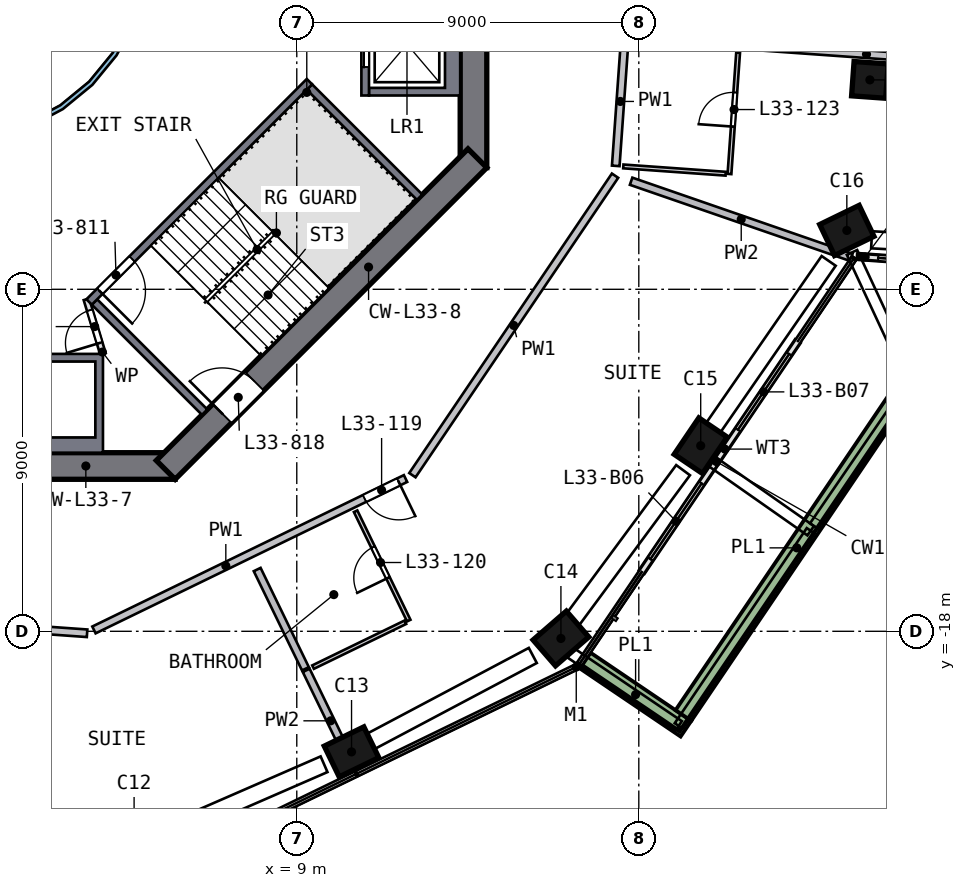
"""IFC4 building model, lengths in metres.
Left out: names, types, materials, properties, quantities, classifications, styles, units other than length and angle.
Written with IfcOpenShell. Run it as: python <this file> out.ifc"""

import sys

from ifc_helpers import new_model, si_unit, direction, frame, frame_2d, origin, origin_2d, place, context, subcontext, project, spatial, polyline, rectangle, outline, extrude, element, fill, save


model = new_model("IFC4")
c1 = context("Model", 3, precision=1e-05, world=origin(), true_north=direction((0.0, 1.0)))
c2 = subcontext(c1, "Body", "Model", "MODEL_VIEW")
j1 = project(units=[si_unit("LENGTHUNIT", "METRE"), si_unit("PLANEANGLEUNIT", "RADIAN")], contexts=[c1])
p1 = place(None, origin())
s1 = spatial("IfcSite", under=j1, at=p1, CompositionType="ELEMENT")
p2 = place(p1, origin())
s2 = spatial("IfcBuilding", under=s1, at=p2, CompositionType="ELEMENT")
p3 = place(p2, frame((0.0, 0.0, 140.0)))
s3 = spatial("IfcBuildingStorey", under=s2, at=p3, CompositionType="ELEMENT", Elevation=140.0)
p4 = place(p3, frame((10.32, -21.233, 0.0), z_axis=(0.100614614, 0.04988903, 0.993673882), x_axis=(0.893958315, 0.433851601, -0.11230013)))
e1 = element("IfcColumn", 1, at=p4, inside=s3, PredefinedType="COLUMN", context=c2, shape_type="SweptSolid", body=[
    extrude(rectangle(XDim=1.15, YDim=0.9, at=origin_2d()), origin(), (0.0, 0.0, 1.0), 3.21),
])
p5 = place(p3, frame((15.846, -18.281, 0.0), z_axis=(0.086290312, 0.076026707, 0.993364949), x_axis=(-0.750890104, -0.650337538, 0.115000597)))
e2 = element("IfcColumn", 2, at=p5, inside=s3, PredefinedType="COLUMN", context=c2, shape_type="SweptSolid", body=[
    extrude(rectangle(XDim=1.15, YDim=0.9, at=origin_2d()), origin(), (0.0, 0.0, 1.0), 3.211),
])
p6 = place(p3, frame((19.554, -13.229, 0.0), z_axis=(0.062208942, 0.093541564, 0.993669977), x_axis=(0.557258378, 0.822705306, -0.112334676)))
e3 = element("IfcColumn", 3, at=p6, inside=s3, PredefinedType="COLUMN", context=c2, shape_type="SweptSolid", body=[
    extrude(rectangle(XDim=1.15, YDim=0.9, at=origin_2d()), origin(), (0.0, 0.0, 1.0), 3.21),
])
p7 = place(p3, frame((23.431, -7.586, 0.0), z_axis=(0.035191514, 0.111731155, 0.993115153), x_axis=(-0.899659746, -0.429169077, 0.080163861)))
e4 = element("IfcColumn", 4, at=p7, inside=s3, PredefinedType="COLUMN", context=c2, shape_type="SweptSolid", body=[
    extrude(rectangle(XDim=1.15, YDim=0.9, at=origin_2d()), origin(), (0.0, 0.0, 1.0), 3.212),
])
p8 = place(p3, frame((24.061, -3.628, 0.0), z_axis=(0.01626837, 0.114562772, 0.993282795), x_axis=(0.997380747, -0.071881336, -0.008044873)))
e5 = element("IfcColumn", 5, at=p8, inside=s3, PredefinedType="COLUMN", context=c2, shape_type="SweptSolid", body=[
    extrude(rectangle(XDim=0.9, YDim=0.9, at=origin_2d()), origin(), (0.0, 0.0, 1.0), 3.211),
])
p9 = place(p3, frame((13.65, -5.799, 0.0), z_axis=(0.0, 0.0, 1.0), x_axis=(0.0, 1.0, 0.0)))
e6 = element("IfcWall", 6, at=p9, inside=s3, PredefinedType="SHEAR", context=c2, shape_type="SweptSolid", body=[
    extrude(rectangle(XDim=11.598, YDim=0.7, at=frame_2d((5.799, 0.0))), origin(), (0.0, 0.0, 1.0), 3.5),
])
p10 = place(p9, frame((4.899, 0.0, 0.0)))
e7 = element("IfcOpeningElement", 7, at=p10, cuts=e6, PredefinedType="OPENING", context=c2, shape_type="SweptSolid", body=[
    extrude(rectangle(XDim=1.8, YDim=2.1, at=frame_2d((0.9, 1.05))), frame((0.0, 0.36, 0.0), z_axis=(0.0, -1.0, 0.0), x_axis=(1.0, 0.0, 0.0)), (0.0, 0.0, 1.0), 0.72),
])
p11 = place(p3, frame((-5.799, -13.65, 0.0), z_axis=(0.0, 0.0, 1.0), x_axis=(1.0, 0.0, 0.0)))
e8 = element("IfcWall", 8, at=p11, inside=s3, PredefinedType="SHEAR", context=c2, shape_type="SweptSolid", body=[
    extrude(rectangle(XDim=11.598, YDim=0.7, at=frame_2d((5.799, 0.0))), origin(), (0.0, 0.0, 1.0), 3.5),
])
p12 = place(p11, frame((4.899, 0.0, 0.0)))
e9 = element("IfcOpeningElement", 9, at=p12, cuts=e8, PredefinedType="OPENING", context=c2, shape_type="SweptSolid", body=[
    extrude(rectangle(XDim=1.8, YDim=2.1, at=frame_2d((0.9, 1.05))), frame((0.0, 0.36, 0.0), z_axis=(0.0, -1.0, 0.0), x_axis=(1.0, 0.0, 0.0)), (0.0, 0.0, 1.0), 0.72),
])
p13 = place(p3, frame((5.552, -13.752, 0.0), z_axis=(0.0, 0.0, 1.0), x_axis=(0.707106781, 0.707106781, 0.0)))
e10 = element("IfcWall", 10, at=p13, inside=s3, PredefinedType="SHEAR", context=c2, shape_type="SweptSolid", body=[
    extrude(rectangle(XDim=11.598, YDim=0.7, at=frame_2d((5.799, 0.0))), origin(), (0.0, 0.0, 1.0), 3.5),
])
p14 = place(p13, frame((2.099, 0.0, 0.0)))
e11 = element("IfcOpeningElement", 11, at=p14, cuts=e10, PredefinedType="OPENING", context=c2, shape_type="SweptSolid", body=[
    extrude(rectangle(XDim=1.2, YDim=2.1, at=frame_2d((0.6, 1.05))), frame((0.0, 0.36, 0.0), z_axis=(0.0, -1.0, 0.0), x_axis=(1.0, 0.0, 0.0)), (0.0, 0.0, 1.0), 0.72),
])
p15 = place(p3, frame((18.083, -16.429, 0.0), z_axis=(0.0, 0.0, 1.0), x_axis=(0.560361819, 0.828247929, 0.0)))
e12 = element("IfcWall", 12, at=p15, inside=s3, PredefinedType="SOLIDWALL", context=c2, shape_type="SweptSolid", body=[
    extrude(rectangle(XDim=3.475, YDim=0.15, at=frame_2d((1.738, 0.0))), origin(), (0.0, 0.0, 1.0), 2.475),
])
p16 = place(p15, frame((0.4, 0.0, 0.0)))
e13 = element("IfcOpeningElement", 13, at=p16, cuts=e12, PredefinedType="OPENING", context=c2, shape_type="SweptSolid", body=[
    extrude(rectangle(XDim=2.4, YDim=2.4, at=frame_2d((1.2, 1.2))), frame((0.0, 0.085, 0.0), z_axis=(0.0, -1.0, 0.0), x_axis=(1.0, 0.0, 0.0)), (0.0, 0.0, 1.0), 0.17),
])
p17 = place(p3, frame((20.03, -13.551, 0.0), z_axis=(0.0, 0.0, 1.0), x_axis=(0.560342762, 0.828260822, 0.0)))
e14 = element("IfcWall", 14, at=p17, inside=s3, PredefinedType="SOLIDWALL", context=c2, shape_type="SweptSolid", body=[
    extrude(rectangle(XDim=3.835, YDim=0.15, at=frame_2d((1.918, 0.0))), origin(), (0.0, 0.0, 1.0), 2.475),
])
p18 = place(p17, frame((1.035, 0.0, 0.0)))
e15 = element("IfcOpeningElement", 15, at=p18, cuts=e14, PredefinedType="OPENING", context=c2, shape_type="SweptSolid", body=[
    extrude(rectangle(XDim=2.4, YDim=2.4, at=frame_2d((1.2, 1.2))), frame((0.0, 0.085, 0.0), z_axis=(0.0, -1.0, 0.0), x_axis=(1.0, 0.0, 0.0)), (0.0, 0.0, 1.0), 0.17),
])
p19 = place(p3, frame((23.81, -8.14, 0.0), z_axis=(0.0, 0.0, 1.0), x_axis=(0.997464717, -0.071162762, 0.0)))
e16 = element("IfcWall", 16, at=p19, inside=s3, PredefinedType="SOLIDWALL", context=c2, shape_type="SweptSolid", body=[
    extrude(rectangle(XDim=3.293, YDim=0.15, at=frame_2d((1.647, 0.0))), origin(), (0.0, 0.0, 1.0), 2.475),
])
p20 = place(p19, frame((0.494, 0.0, 0.0)))
e17 = element("IfcOpeningElement", 17, at=p20, cuts=e16, PredefinedType="OPENING", context=c2, shape_type="SweptSolid", body=[
    extrude(rectangle(XDim=2.4, YDim=2.4, at=frame_2d((1.2, 1.2))), frame((0.0, 0.085, 0.0), z_axis=(0.0, -1.0, 0.0), x_axis=(1.0, 0.0, 0.0)), (0.0, 0.0, 1.0), 0.17),
])
p21 = place(p3, frame((16.591, -18.77, 0.0), z_axis=(0.0, 0.0, 1.0), x_axis=(0.828214652, -0.560411001, 0.0)))
e18 = element("IfcWall", 18, at=p21, inside=s3, PredefinedType="SOLIDWALL", context=c2, shape_type="SweptSolid", body=[
    extrude(rectangle(XDim=3.199, YDim=0.5, at=frame_2d((1.6, 0.0))), origin(), (0.0, 0.0, 1.0), 0.7),
])
p22 = place(p3, frame((19.173, -20.216, 0.0), z_axis=(0.0, 0.0, 1.0), x_axis=(0.560356999, 0.82825119, 0.0)))
e19 = element("IfcWall", 19, at=p22, inside=s3, PredefinedType="SOLIDWALL", context=c2, shape_type="SweptSolid", body=[
    extrude(rectangle(XDim=10.653, YDim=0.5, at=frame_2d((5.326, 0.0))), origin(), (0.0, 0.0, 1.0), 0.7),
])
p23 = place(p3, origin())
e20 = element("IfcWall", 20, at=p23, inside=s3, PredefinedType="SOLIDWALL", context=c2, shape_type="SweptSolid", body=[
    extrude(outline(polyline([(13.3, -3.9), (10.9, -3.9), (10.9, -3.7), (12.9, -3.7), (12.9, -1.4), (10.9, -1.4), (10.9, -1.2), (13.3, -1.2), (13.3, -3.9)])), origin(), (0.0, 0.0, 1.0), 3.19),
])
p24 = place(p3, frame((10.8, -1.2, 0.0), z_axis=(0.0, 0.0, 1.0), x_axis=(0.0, -1.0, 0.0)))
e21 = element("IfcWall", 21, at=p24, inside=s3, PredefinedType="SOLIDWALL", context=c2, shape_type="SweptSolid", body=[
    extrude(rectangle(XDim=2.7, YDim=0.2, at=frame_2d((1.35, 0.0))), origin(), (0.0, 0.0, 1.0), 3.19),
])
p25 = place(p24, frame((0.75, 0.0, 0.0)))
e22 = element("IfcOpeningElement", 22, at=p25, cuts=e21, PredefinedType="OPENING", context=c2, shape_type="SweptSolid", body=[
    extrude(rectangle(XDim=1.2, YDim=2.1, at=frame_2d((0.6, 1.05))), frame((0.0, 0.11, 0.0), z_axis=(0.0, -1.0, 0.0), x_axis=(1.0, 0.0, 0.0)), (0.0, 0.0, 1.0), 0.22),
])
p26 = place(p3, origin())
e23 = element("IfcWall", 23, at=p26, inside=s3, PredefinedType="SOLIDWALL", context=c2, shape_type="SweptSolid", body=[
    extrude(outline(polyline([(3.9, -10.7), (3.9, -13.3), (1.2, -13.3), (1.2, -10.7), (3.9, -10.7)]), holes=[polyline([(1.4, -12.9), (3.7, -12.9), (3.7, -10.9), (1.4, -10.9), (1.4, -12.9)])]), origin(), (0.0, 0.0, 1.0), 3.19),
])
p27 = place(p3, frame((9.334, -3.535, 0.0), z_axis=(0.0, 0.0, 1.0), x_axis=(-0.707106781, -0.707106781, 0.0)))
e24 = element("IfcWall", 24, at=p27, inside=s3, PredefinedType="SOLIDWALL", context=c2, shape_type="SweptSolid", body=[
    extrude(rectangle(XDim=8.2, YDim=0.2, at=frame_2d((4.1, 0.0))), origin(), (0.0, 0.0, 1.0), 3.19),
])
p28 = place(p27, frame((6.6, 0.0, 0.0)))
e25 = element("IfcOpeningElement", 25, at=p28, cuts=e24, PredefinedType="OPENING", context=c2, shape_type="SweptSolid", body=[
    extrude(rectangle(XDim=1.2, YDim=2.1, at=frame_2d((0.6, 1.05))), frame((0.0, 0.11, 0.0), z_axis=(0.0, -1.0, 0.0), x_axis=(1.0, 0.0, 0.0)), (0.0, 0.0, 1.0), 0.22),
])
for number, where, z_axis, x_axis in (
    (26, (3.677, -9.334, 0.0), (0.0, 0.0, 1.0), (0.707, -0.707, 0.0)),
    (27, (9.334, -3.677, 0.0), (0.0, 0.0, 1.0), (0.707, -0.707, 0.0)),
):
    element("IfcWall", number, at=place(p3, frame(where, z_axis=z_axis, x_axis=x_axis)), inside=s3, PredefinedType="SOLIDWALL", context=c2, shape_type="SweptSolid", body=[
        extrude(rectangle(XDim=4.1, YDim=0.2, at=frame_2d((2.05, 0.0))), origin(), (0.0, 0.0, 1.0), 3.19),
    ])
p29 = place(p3, frame((3.9, -10.7, 0.0), z_axis=(0.0, 0.0, 1.0), x_axis=(-0.289808785, 0.957084567, 0.0)))
e28 = element("IfcWall", 28, at=p29, inside=s3, PredefinedType="PARTITIONING", context=c2, shape_type="SweptSolid", body=[
    extrude(rectangle(XDim=1.501, YDim=0.15, at=frame_2d((0.75, 0.0))), origin(), (0.0, 0.0, 1.0), 3.19),
])
p30 = place(p29, frame((0.301, 0.0, 0.0)))
e29 = element("IfcOpeningElement", 29, at=p30, cuts=e28, PredefinedType="OPENING", context=c2, shape_type="SweptSolid", body=[
    extrude(rectangle(XDim=0.9, YDim=2.1, at=frame_2d((0.45, 1.05))), frame((0.0, 0.085, 0.0), z_axis=(0.0, -1.0, 0.0), x_axis=(1.0, 0.0, 0.0)), (0.0, 0.0, 1.0), 0.17),
])
p31 = place(p3, origin())
e30 = element("IfcWall", 30, at=p31, inside=s3, PredefinedType="SOLIDWALL", context=c2, shape_type="SweptSolid", body=[
    extrude(outline(polyline([(5.021, -0.999), (4.73, -1.959), (4.257, -2.844), (3.62, -3.62), (2.844, -4.257), (1.959, -4.73), (0.999, -5.021), (0.0, -5.12), (-0.999, -5.021), (-1.959, -4.73), (-2.844, -4.257), (-3.62, -3.62), (-4.257, -2.844), (-4.73, -1.959), (-5.021, -0.999), (-5.12, 0.0), (-5.021, 0.999), (-4.73, 1.959), (-4.257, 2.844), (-3.62, 3.62), (-2.844, 4.257), (-1.959, 4.73), (-0.999, 5.021), (0.0, 5.12), (0.999, 5.021), (1.959, 4.73), (2.844, 4.257), (3.62, 3.62), (4.257, 2.844), (4.73, 1.959), (5.021, 0.999), (5.12, 0.0), (5.021, -0.999)]), holes=[polyline([(4.904, 0.976), (4.619, 1.913), (4.157, 2.778), (3.535, 3.535), (2.778, 4.157), (1.913, 4.619), (0.976, 4.904), (0.0, 5.0), (-0.976, 4.904), (-1.913, 4.619), (-2.778, 4.157), (-3.535, 3.535), (-4.157, 2.778), (-4.619, 1.913), (-4.904, 0.976), (-5.0, 0.0), (-4.904, -0.976), (-4.619, -1.913), (-4.157, -2.778), (-3.535, -3.535), (-2.778, -4.157), (-1.913, -4.619), (-0.976, -4.904), (0.0, -5.0), (0.976, -4.904), (1.913, -4.619), (2.778, -4.157), (3.535, -3.535), (4.157, -2.778), (4.619, -1.913), (4.904, -0.976), (5.0, 0.0), (4.904, 0.976)])]), origin(), (0.0, 0.0, 1.0), 3.19),
])
p32 = place(p3, frame((3.482, -18.052, 0.0), z_axis=(0.0, 0.0, 1.0), x_axis=(-0.997466118, 0.071143125, 0.0)))
e31 = element("IfcWall", 31, at=p32, inside=s3, PredefinedType="SOLIDWALL", context=c2, shape_type="SweptSolid", body=[
    extrude(rectangle(XDim=9.516, YDim=0.2, at=frame_2d((4.758, 0.0))), origin(), (0.0, 0.0, 1.0), 3.19),
])
p33 = place(p32, frame((5.15, 0.0, 0.0)))
e32 = element("IfcOpeningElement", 32, at=p33, cuts=e31, PredefinedType="OPENING", context=c2, shape_type="SweptSolid", body=[
    extrude(rectangle(XDim=1.0, YDim=2.1, at=frame_2d((0.5, 1.05))), frame((0.0, 0.11, 0.0), z_axis=(0.0, -1.0, 0.0), x_axis=(1.0, 0.0, 0.0)), (0.0, 0.0, 1.0), 0.22),
])
p34 = place(p3, frame((11.862, -13.98, 0.0), z_axis=(0.0, 0.0, 1.0), x_axis=(-0.899416115, -0.437093413, 0.0)))
e33 = element("IfcWall", 33, at=p34, inside=s3, PredefinedType="SOLIDWALL", context=c2, shape_type="SweptSolid", body=[
    extrude(rectangle(XDim=9.116, YDim=0.2, at=frame_2d((4.558, 0.0))), origin(), (0.0, 0.0, 1.0), 3.19),
])
p35 = place(p34, frame((0.2, 0.0, 0.0)))
e34 = element("IfcOpeningElement", 34, at=p35, cuts=e33, PredefinedType="OPENING", context=c2, shape_type="SweptSolid", body=[
    extrude(rectangle(XDim=1.0, YDim=2.1, at=frame_2d((0.5, 1.05))), frame((0.0, 0.11, 0.0), z_axis=(0.0, -1.0, 0.0), x_axis=(1.0, 0.0, 0.0)), (0.0, 0.0, 1.0), 0.22),
])
p36 = place(p3, frame((12.042, -13.892, 0.0), z_axis=(0.0, 0.0, 1.0), x_axis=(0.560341463, 0.828261701, 0.0)))
e35 = element("IfcWall", 35, at=p36, inside=s3, PredefinedType="SOLIDWALL", context=c2, shape_type="SweptSolid", body=[
    extrude(rectangle(XDim=9.516, YDim=0.2, at=frame_2d((4.758, 0.0))), origin(), (0.0, 0.0, 1.0), 3.19),
])
p37 = place(p3, frame((17.393, -5.752, 0.0), z_axis=(0.0, 0.0, 1.0), x_axis=(0.071083764, 0.99747035, 0.0)))
e36 = element("IfcWall", 36, at=p37, inside=s3, PredefinedType="SOLIDWALL", context=c2, shape_type="SweptSolid", body=[
    extrude(rectangle(XDim=3.4, YDim=0.2, at=frame_2d((1.7, 0.0))), origin(), (0.0, 0.0, 1.0), 3.19),
])
p38 = place(p3, frame((17.835, -2.375, 0.0), z_axis=(0.0, 0.0, 1.0), x_axis=(0.997465321, -0.071154293, 0.0)))
e37 = element("IfcWall", 37, at=p38, inside=s3, PredefinedType="SOLIDWALL", context=c2, shape_type="SweptSolid", body=[
    extrude(rectangle(XDim=12.345, YDim=0.2, at=frame_2d((6.173, 0.0))), origin(), (0.0, 0.0, 1.0), 3.19),
])
p39 = place(p3, frame((7.958, -16.374, 0.0), z_axis=(0.0, 0.0, 1.0), x_axis=(0.437133221, -0.899396769, 0.0)))
e38 = element("IfcWall", 38, at=p39, inside=s3, PredefinedType="SOLIDWALL", context=c2, shape_type="SweptSolid", body=[
    extrude(rectangle(XDim=2.905, YDim=0.2, at=frame_2d((1.452, 0.0))), origin(), (0.0, 0.0, 1.0), 3.19),
])
p40 = place(p3, frame((9.248, -19.028, 0.0), z_axis=(0.0, 0.0, 1.0), x_axis=(0.437095146, -0.899415273, 0.0)))
e39 = element("IfcWall", 39, at=p40, inside=s3, PredefinedType="SOLIDWALL", context=c2, shape_type="SweptSolid", body=[
    extrude(rectangle(XDim=2.952, YDim=0.2, at=frame_2d((1.476, 0.0))), origin(), (0.0, 0.0, 1.0), 3.19),
])
p41 = place(p3, frame((17.798, -6.156, 0.0), z_axis=(0.0, 0.0, 1.0), x_axis=(0.945063679, -0.326886283, 0.0)))
e40 = element("IfcWall", 40, at=p41, inside=s3, PredefinedType="SOLIDWALL", context=c2, shape_type="SweptSolid", body=[
    extrude(rectangle(XDim=6.132, YDim=0.2, at=frame_2d((3.066, 0.0))), origin(), (0.0, 0.0, 1.0), 3.19),
])
p42 = place(p3, frame((11.857, -17.762, 0.0), z_axis=(0.0, 0.0, 1.0), x_axis=(-0.899415747, -0.437094171, 0.0)))
e41 = element("IfcWall", 41, at=p42, inside=s3, PredefinedType="PARTITIONING", context=c2, shape_type="SweptSolid", body=[
    extrude(rectangle(XDim=2.7, YDim=0.1, at=frame_2d((1.35, 0.0))), origin(), (0.0, 0.0, 1.0), 3.19),
])
p43 = place(p3, frame((11.947, -17.719, 0.0), z_axis=(0.0, 0.0, 1.0), x_axis=(-0.437175564, 0.899376187, 0.0)))
e42 = element("IfcWall", 42, at=p43, inside=s3, PredefinedType="PARTITIONING", context=c2, shape_type="SweptSolid", body=[
    extrude(rectangle(XDim=3.2, YDim=0.1, at=frame_2d((1.6, 0.0))), origin(), (0.0, 0.0, 1.0), 3.19),
])
p44 = place(p43, frame((1.25, 0.0, 0.0)))
e43 = element("IfcOpeningElement", 43, at=p44, cuts=e42, PredefinedType="OPENING", context=c2, shape_type="SweptSolid", body=[
    extrude(rectangle(XDim=0.9, YDim=2.1, at=frame_2d((0.45, 1.05))), frame((0.0, 0.06, 0.0), z_axis=(0.0, -1.0, 0.0), x_axis=(1.0, 0.0, 0.0)), (0.0, 0.0, 1.0), 0.12),
])
p45 = place(p3, frame((17.593, -5.766, 0.0), z_axis=(0.0, 0.0, 1.0), x_axis=(0.997465121, -0.071157093, 0.0)))
e44 = element("IfcWall", 44, at=p45, inside=s3, PredefinedType="PARTITIONING", context=c2, shape_type="SweptSolid", body=[
    extrude(rectangle(XDim=2.7, YDim=0.1, at=frame_2d((1.35, 0.0))), origin(), (0.0, 0.0, 1.0), 3.19),
])
p46 = place(p3, frame((20.385, -5.966, 0.0), z_axis=(0.0, 0.0, 1.0), x_axis=(0.071181987, 0.997463345, 0.0)))
e45 = element("IfcWall", 45, at=p46, inside=s3, PredefinedType="PARTITIONING", context=c2, shape_type="SweptSolid", body=[
    extrude(rectangle(XDim=3.2, YDim=0.1, at=frame_2d((1.6, 0.0))), origin(), (0.0, 0.0, 1.0), 3.19),
])
p47 = place(p46, frame((1.25, 0.0, 0.0)))
e46 = element("IfcOpeningElement", 46, at=p47, cuts=e45, PredefinedType="OPENING", context=c2, shape_type="SweptSolid", body=[
    extrude(rectangle(XDim=0.9, YDim=2.1, at=frame_2d((0.45, 1.05))), frame((0.0, 0.06, 0.0), z_axis=(0.0, -1.0, 0.0), x_axis=(1.0, 0.0, 0.0)), (0.0, 0.0, 1.0), 0.12),
])
p48 = place(p16, origin())
e47 = element("IfcDoor", 47, at=p48, inside=s3, OperationType="SLIDING_TO_RIGHT", PredefinedType="DOOR", context=c2, shape_type="SweptSolid", body=[
    extrude(rectangle(XDim=2.4, YDim=2.4, at=frame_2d((1.2, 1.2))), frame((0.0, 0.025, 0.0), z_axis=(0.0, -1.0, 0.0), x_axis=(1.0, 0.0, 0.0)), (0.0, 0.0, 1.0), 0.05),
])
fill(e13, e47)
p49 = place(p18, origin())
e48 = element("IfcDoor", 48, at=p49, inside=s3, OperationType="SLIDING_TO_LEFT", PredefinedType="DOOR", context=c2, shape_type="SweptSolid", body=[
    extrude(rectangle(XDim=2.4, YDim=2.4, at=frame_2d((1.2, 1.2))), frame((0.0, 0.025, 0.0), z_axis=(0.0, -1.0, 0.0), x_axis=(1.0, 0.0, 0.0)), (0.0, 0.0, 1.0), 0.05),
])
fill(e15, e48)
p50 = place(p20, origin())
e49 = element("IfcDoor", 49, at=p50, inside=s3, OperationType="SLIDING_TO_LEFT", PredefinedType="DOOR", context=c2, shape_type="SweptSolid", body=[
    extrude(rectangle(XDim=2.4, YDim=2.4, at=frame_2d((1.2, 1.2))), frame((0.0, 0.025, 0.0), z_axis=(0.0, -1.0, 0.0), x_axis=(1.0, 0.0, 0.0)), (0.0, 0.0, 1.0), 0.05),
])
fill(e17, e49)
p51 = place(p25, origin())
e50 = element("IfcDoor", 50, at=p51, inside=s3, OperationType="DOUBLE_DOOR_SLIDING", PredefinedType="DOOR", context=c2, shape_type="SweptSolid", body=[
    extrude(rectangle(XDim=1.2, YDim=2.1, at=frame_2d((0.6, 1.05))), frame((0.0, 0.025, 0.0), z_axis=(0.0, -1.0, 0.0), x_axis=(1.0, 0.0, 0.0)), (0.0, 0.0, 1.0), 0.05),
])
fill(e22, e50)
p52 = place(p28, origin())
e51 = element("IfcDoor", 51, at=p52, inside=s3, OperationType="SINGLE_SWING_RIGHT", PredefinedType="DOOR", context=c2, shape_type="SweptSolid", body=[
    extrude(rectangle(XDim=1.2, YDim=2.1, at=frame_2d((0.6, 1.05))), frame((0.0, 0.025, 0.0), z_axis=(0.0, -1.0, 0.0), x_axis=(1.0, 0.0, 0.0)), (0.0, 0.0, 1.0), 0.05),
])
fill(e25, e51)
p53 = place(p14, origin())
e52 = element("IfcDoor", 52, at=p53, inside=s3, OperationType="SINGLE_SWING_LEFT", PredefinedType="DOOR", context=c2, shape_type="SweptSolid", body=[
    extrude(rectangle(XDim=1.2, YDim=2.1, at=frame_2d((0.6, 1.05))), frame((0.0, 0.025, 0.0), z_axis=(0.0, -1.0, 0.0), x_axis=(1.0, 0.0, 0.0)), (0.0, 0.0, 1.0), 0.05),
])
fill(e11, e52)
p54 = place(p30, origin())
e53 = element("IfcDoor", 53, at=p54, inside=s3, OperationType="SINGLE_SWING_LEFT", PredefinedType="DOOR", context=c2, shape_type="SweptSolid", body=[
    extrude(rectangle(XDim=0.9, YDim=2.1, at=frame_2d((0.45, 1.05))), frame((0.0, 0.025, 0.0), z_axis=(0.0, -1.0, 0.0), x_axis=(1.0, 0.0, 0.0)), (0.0, 0.0, 1.0), 0.05),
])
fill(e29, e53)
p55 = place(p35, origin())
e54 = element("IfcDoor", 54, at=p55, inside=s3, OperationType="SINGLE_SWING_LEFT", PredefinedType="DOOR", context=c2, shape_type="SweptSolid", body=[
    extrude(rectangle(XDim=1.0, YDim=2.1, at=frame_2d((0.5, 1.05))), frame((0.0, 0.025, 0.0), z_axis=(0.0, -1.0, 0.0), x_axis=(1.0, 0.0, 0.0)), (0.0, 0.0, 1.0), 0.05),
])
fill(e34, e54)
p56 = place(p44, origin())
e55 = element("IfcDoor", 55, at=p56, inside=s3, OperationType="SINGLE_SWING_LEFT", PredefinedType="DOOR", context=c2, shape_type="SweptSolid", body=[
    extrude(rectangle(XDim=0.9, YDim=2.1, at=frame_2d((0.45, 1.05))), frame((0.0, 0.025, 0.0), z_axis=(0.0, -1.0, 0.0), x_axis=(1.0, 0.0, 0.0)), (0.0, 0.0, 1.0), 0.05),
])
fill(e43, e55)
p57 = place(p47, origin())
e56 = element("IfcDoor", 56, at=p57, inside=s3, OperationType="SINGLE_SWING_LEFT", PredefinedType="DOOR", context=c2, shape_type="SweptSolid", body=[
    extrude(rectangle(XDim=0.9, YDim=2.1, at=frame_2d((0.45, 1.05))), frame((0.0, 0.025, 0.0), z_axis=(0.0, -1.0, 0.0), x_axis=(1.0, 0.0, 0.0)), (0.0, 0.0, 1.0), 0.05),
])
fill(e46, e56)
save(model, sys.argv[1])
